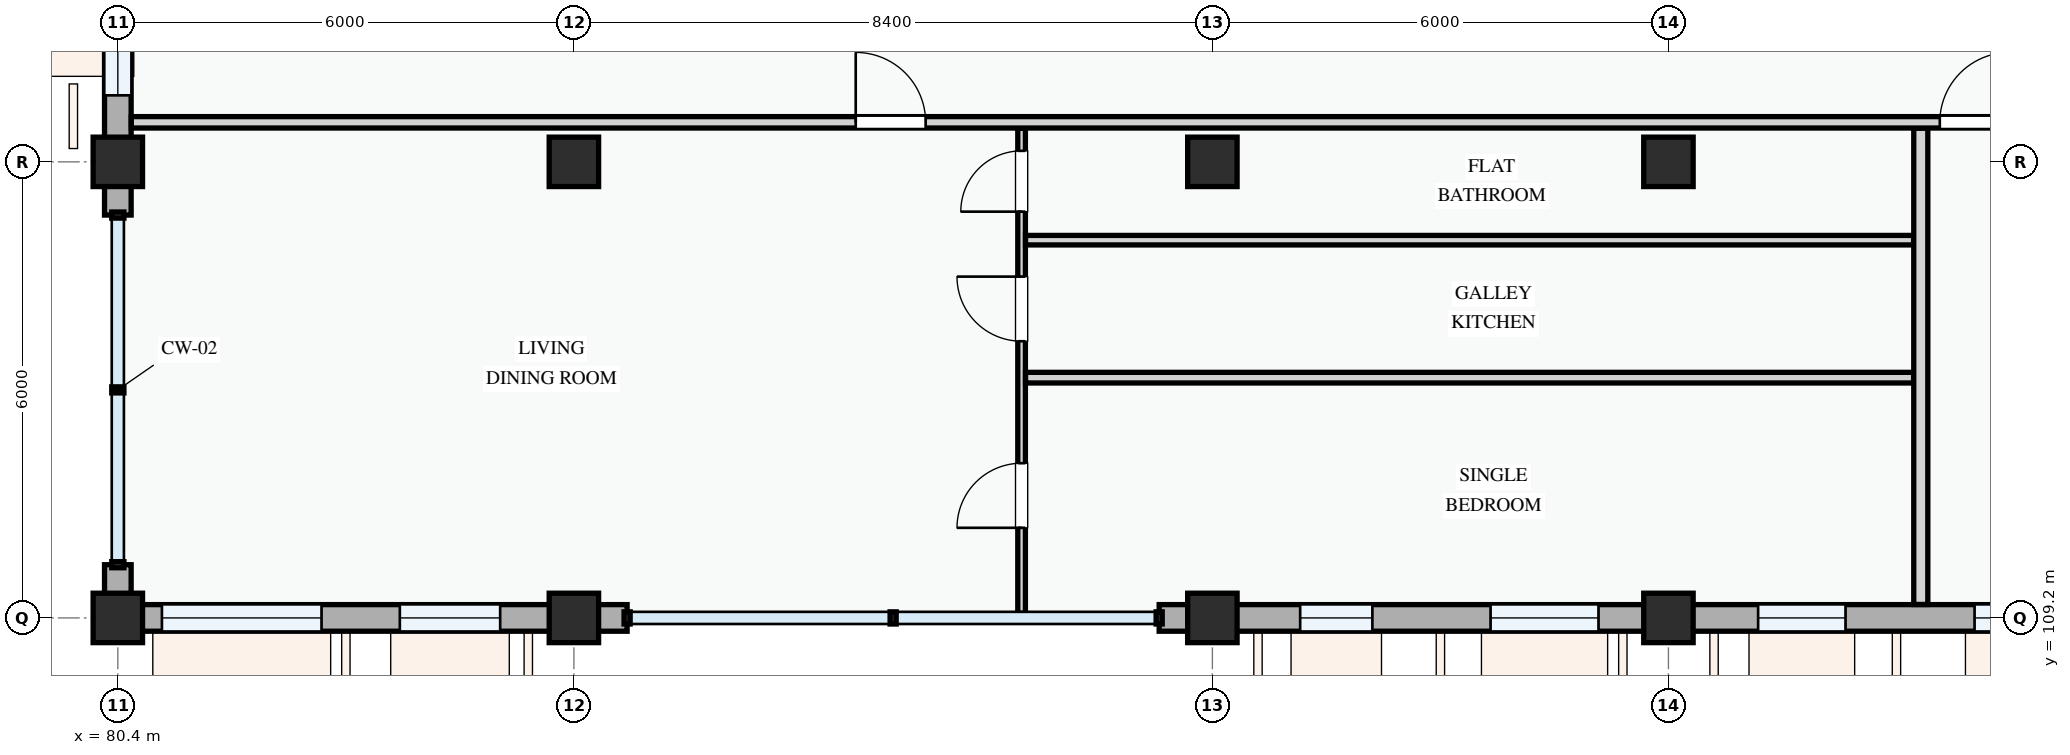
"""IFC4 building model, lengths in metres.
Left out: names, types, materials, properties, quantities, classifications, styles, units other than length and angle.
Written with IfcOpenShell. Run it as: python <this file> out.ifc"""

import sys

from ifc_helpers import new_model, si_unit, direction, frame, frame_2d, origin, origin_2d, place, context, subcontext, project, spatial, rectangle, extrude, element, fill, save


model = new_model("IFC4")
c1 = context("Model", 3, precision=1e-05, world=origin(), true_north=direction((0.0, 1.0)))
c2 = subcontext(c1, "Body", "Model", "MODEL_VIEW")
j1 = project(units=[si_unit("LENGTHUNIT", "METRE"), si_unit("PLANEANGLEUNIT", "RADIAN")], contexts=[c1])
p1 = place(None, origin())
s1 = spatial("IfcSite", under=j1, at=p1, CompositionType="ELEMENT")
p2 = place(p1, origin())
s2 = spatial("IfcBuilding", under=s1, at=p2, CompositionType="ELEMENT")
p3 = place(p2, frame((0.0, 0.0, 11.4)))
s3 = spatial("IfcBuildingStorey", under=s2, at=p3, CompositionType="ELEMENT", Elevation=11.4)
for number, where, z_axis, x_axis in (
    (1, (80.4, 109.2, 0.0), (0.0, 0.0, 1.0), (1.0, 0.0, 0.0)),
    (2, (80.4, 115.2, 0.0), (0.0, 0.0, 1.0), (1.0, 0.0, 0.0)),
    (3, (86.4, 109.2, 0.0), (0.0, 0.0, 1.0), (1.0, 0.0, 0.0)),
    (4, (86.4, 115.2, 0.0), (0.0, 0.0, 1.0), (1.0, 0.0, 0.0)),
    (5, (94.8, 109.2, 0.0), (0.0, 0.0, 1.0), (1.0, 0.0, 0.0)),
    (6, (94.8, 115.2, 0.0), (0.0, 0.0, 1.0), (1.0, 0.0, 0.0)),
    (7, (100.8, 109.2, 0.0), (0.0, 0.0, 1.0), (1.0, 0.0, 0.0)),
    (8, (100.8, 115.2, 0.0), (0.0, 0.0, 1.0), (1.0, 0.0, 0.0)),
):
    element("IfcColumn", number, at=place(p3, frame(where, z_axis=z_axis, x_axis=x_axis)), inside=s3, PredefinedType="COLUMN", context=c2, shape_type="SweptSolid", body=[
        extrude(rectangle(XDim=0.65, YDim=0.65, at=origin_2d()), origin(), (0.0, 0.0, 1.0), 3.3),
    ])
p4 = place(p3, frame((80.4, 123.6, 0.0), z_axis=(0.0, 0.0, 1.0), x_axis=(0.0, -1.0, 0.0)))
e9 = element("IfcWall", 9, at=p4, inside=s3, PredefinedType="STANDARD", context=c2, shape_type="SweptSolid", body=[
    extrude(rectangle(XDim=8.4, YDim=0.35, at=frame_2d((4.2, 0.0))), origin(), (0.0, 0.0, 1.0), 2.425),
])
p5 = place(p4, frame((0.593, 0.0, 0.78)))
e10 = element("IfcOpeningElement", 10, at=p5, cuts=e9, PredefinedType="OPENING", context=c2, shape_type="SweptSolid", body=[
    extrude(rectangle(XDim=2.18, YDim=1.48, at=frame_2d((1.09, 0.74))), frame((0.0, 0.185, 0.0), z_axis=(0.0, -1.0, 0.0), x_axis=(1.0, 0.0, 0.0)), (0.0, 0.0, 1.0), 0.37),
])
p6 = place(p4, frame((4.028, 0.0, 0.78)))
e11 = element("IfcOpeningElement", 11, at=p6, cuts=e9, PredefinedType="OPENING", context=c2, shape_type="SweptSolid", body=[
    extrude(rectangle(XDim=1.0, YDim=1.25, at=frame_2d((0.5, 0.625))), frame((0.0, 0.185, 0.0), z_axis=(0.0, -1.0, 0.0), x_axis=(1.0, 0.0, 0.0)), (0.0, 0.0, 1.0), 0.37),
])
p7 = place(p4, frame((6.375, 0.0, 0.78)))
e12 = element("IfcOpeningElement", 12, at=p7, cuts=e9, PredefinedType="OPENING", context=c2, shape_type="SweptSolid", body=[
    extrude(rectangle(XDim=1.15, YDim=1.25, at=frame_2d((0.575, 0.625))), frame((0.0, 0.185, 0.0), z_axis=(0.0, -1.0, 0.0), x_axis=(1.0, 0.0, 0.0)), (0.0, 0.0, 1.0), 0.37),
])
p8 = place(p3, frame((80.4, 115.2, 0.0), z_axis=(0.0, 0.0, 1.0), x_axis=(0.0, -1.0, 0.0)))
e13 = element("IfcWall", 13, at=p8, inside=s3, PredefinedType="STANDARD", context=c2, shape_type="SweptSolid", body=[
    extrude(rectangle(XDim=0.7, YDim=0.35, at=frame_2d((0.35, 0.0))), origin(), (0.0, 0.0, 1.0), 2.575),
])
p9 = place(p3, frame((80.4, 109.9, 0.0), z_axis=(0.0, 0.0, 1.0), x_axis=(0.0, -1.0, 0.0)))
e14 = element("IfcWall", 14, at=p9, inside=s3, PredefinedType="STANDARD", context=c2, shape_type="SweptSolid", body=[
    extrude(rectangle(XDim=0.523, YDim=0.35, at=frame_2d((0.261, 0.0))), origin(), (0.0, 0.0, 1.0), 2.575),
])
p10 = place(p3, frame((80.4, 109.2, 0.0), z_axis=(0.0, 0.0, 1.0), x_axis=(1.0, 0.0, 0.0)))
e15 = element("IfcWall", 15, at=p10, inside=s3, PredefinedType="STANDARD", context=c2, shape_type="SweptSolid", body=[
    extrude(rectangle(XDim=6.0, YDim=0.35, at=frame_2d((3.0, 0.0))), origin(), (0.0, 0.0, 1.0), 2.475),
])
p11 = place(p10, frame((0.58, 0.0, 0.78)))
e16 = element("IfcOpeningElement", 16, at=p11, cuts=e15, PredefinedType="OPENING", context=c2, shape_type="SweptSolid", body=[
    extrude(rectangle(XDim=2.1, YDim=1.55, at=frame_2d((1.05, 0.775))), frame((0.0, 0.185, 0.0), z_axis=(0.0, -1.0, 0.0), x_axis=(1.0, 0.0, 0.0)), (0.0, 0.0, 1.0), 0.37),
])
p12 = place(p10, frame((3.71, 0.0, 0.78)))
e17 = element("IfcOpeningElement", 17, at=p12, cuts=e15, PredefinedType="OPENING", context=c2, shape_type="SweptSolid", body=[
    extrude(rectangle(XDim=1.32, YDim=1.35, at=frame_2d((0.66, 0.675))), frame((0.0, 0.185, 0.0), z_axis=(0.0, -1.0, 0.0), x_axis=(1.0, 0.0, 0.0)), (0.0, 0.0, 1.0), 0.37),
])
p13 = place(p3, frame((86.4, 109.2, 0.0), z_axis=(0.0, 0.0, 1.0), x_axis=(1.0, 0.0, 0.0)))
e18 = element("IfcWall", 18, at=p13, inside=s3, PredefinedType="STANDARD", context=c2, shape_type="SweptSolid", body=[
    extrude(rectangle(XDim=0.7, YDim=0.35, at=frame_2d((0.35, 0.0))), origin(), (0.0, 0.0, 1.0), 2.375),
])
p14 = place(p3, frame((94.1, 109.2, 0.0), z_axis=(0.0, 0.0, 1.0), x_axis=(1.0, 0.0, 0.0)))
e19 = element("IfcWall", 19, at=p14, inside=s3, PredefinedType="STANDARD", context=c2, shape_type="SweptSolid", body=[
    extrude(rectangle(XDim=0.7, YDim=0.35, at=frame_2d((0.35, 0.0))), origin(), (0.0, 0.0, 1.0), 2.375),
])
p15 = place(p3, frame((94.8, 109.2, 0.0), z_axis=(0.0, 0.0, 1.0), x_axis=(1.0, 0.0, 0.0)))
e20 = element("IfcWall", 20, at=p15, inside=s3, PredefinedType="STANDARD", context=c2, shape_type="SweptSolid", body=[
    extrude(rectangle(XDim=6.0, YDim=0.35, at=frame_2d((3.0, 0.0))), origin(), (0.0, 0.0, 1.0), 2.475),
])
p16 = place(p15, frame((1.155, 0.0, 0.78)))
e21 = element("IfcOpeningElement", 21, at=p16, cuts=e20, PredefinedType="OPENING", context=c2, shape_type="SweptSolid", body=[
    extrude(rectangle(XDim=0.95, YDim=1.15, at=frame_2d((0.475, 0.575))), frame((0.0, 0.185, 0.0), z_axis=(0.0, -1.0, 0.0), x_axis=(1.0, 0.0, 0.0)), (0.0, 0.0, 1.0), 0.37),
])
p17 = place(p15, frame((3.66, 0.0, 0.78)))
e22 = element("IfcOpeningElement", 22, at=p17, cuts=e20, PredefinedType="OPENING", context=c2, shape_type="SweptSolid", body=[
    extrude(rectangle(XDim=1.42, YDim=1.38, at=frame_2d((0.71, 0.69))), frame((0.0, 0.185, 0.0), z_axis=(0.0, -1.0, 0.0), x_axis=(1.0, 0.0, 0.0)), (0.0, 0.0, 1.0), 0.37),
])
p18 = place(p3, frame((100.8, 109.2, 0.0), z_axis=(0.0, 0.0, 1.0), x_axis=(1.0, 0.0, 0.0)))
e23 = element("IfcWall", 23, at=p18, inside=s3, PredefinedType="STANDARD", context=c2, shape_type="SweptSolid", body=[
    extrude(rectangle(XDim=8.4, YDim=0.35, at=frame_2d((4.2, 0.0))), origin(), (0.0, 0.0, 1.0), 2.375),
])
p19 = place(p18, frame((1.18, 0.0, 0.78)))
e24 = element("IfcOpeningElement", 24, at=p19, cuts=e23, PredefinedType="OPENING", context=c2, shape_type="SweptSolid", body=[
    extrude(rectangle(XDim=1.15, YDim=1.25, at=frame_2d((0.575, 0.625))), frame((0.0, 0.185, 0.0), z_axis=(0.0, -1.0, 0.0), x_axis=(1.0, 0.0, 0.0)), (0.0, 0.0, 1.0), 0.37),
])
p20 = place(p18, frame((4.028, 0.0, 0.78)))
e25 = element("IfcOpeningElement", 25, at=p20, cuts=e23, PredefinedType="OPENING", context=c2, shape_type="SweptSolid", body=[
    extrude(rectangle(XDim=1.1, YDim=1.3, at=frame_2d((0.55, 0.65))), frame((0.0, 0.185, 0.0), z_axis=(0.0, -1.0, 0.0), x_axis=(1.0, 0.0, 0.0)), (0.0, 0.0, 1.0), 0.37),
])
p21 = place(p18, frame((6.427, 0.0, 0.78)))
e26 = element("IfcOpeningElement", 26, at=p21, cuts=e23, PredefinedType="OPENING", context=c2, shape_type="SweptSolid", body=[
    extrude(rectangle(XDim=1.05, YDim=1.2, at=frame_2d((0.525, 0.6))), frame((0.0, 0.185, 0.0), z_axis=(0.0, -1.0, 0.0), x_axis=(1.0, 0.0, 0.0)), (0.0, 0.0, 1.0), 0.37),
])
p22 = place(p3, frame((92.29, 109.26, 0.0), z_axis=(0.0, 0.0, 1.0), x_axis=(0.0, 1.0, 0.0)))
e27 = element("IfcWall", 27, at=p22, inside=s3, PredefinedType="PARTITIONING", context=c2, shape_type="SweptSolid", body=[
    extrude(rectangle(XDim=6.383, YDim=0.1, at=frame_2d((3.191, 0.0))), origin(), (0.0, 0.0, 1.0), 3.0),
])
p23 = place(p22, frame((1.125, 0.0, 0.0)))
e28 = element("IfcOpeningElement", 28, at=p23, cuts=e27, PredefinedType="OPENING", context=c2, shape_type="SweptSolid", body=[
    extrude(rectangle(XDim=0.85, YDim=2.1, at=frame_2d((0.425, 1.05))), frame((0.0, 0.06, 0.0), z_axis=(0.0, -1.0, 0.0), x_axis=(1.0, 0.0, 0.0)), (0.0, 0.0, 1.0), 0.12),
])
p24 = place(p22, frame((3.58, 0.0, 0.0)))
e29 = element("IfcOpeningElement", 29, at=p24, cuts=e27, PredefinedType="OPENING", context=c2, shape_type="SweptSolid", body=[
    extrude(rectangle(XDim=0.85, YDim=2.1, at=frame_2d((0.425, 1.05))), frame((0.0, 0.06, 0.0), z_axis=(0.0, -1.0, 0.0), x_axis=(1.0, 0.0, 0.0)), (0.0, 0.0, 1.0), 0.12),
])
p25 = place(p22, frame((5.285, 0.0, 0.0)))
e30 = element("IfcOpeningElement", 30, at=p25, cuts=e27, PredefinedType="OPENING", context=c2, shape_type="SweptSolid", body=[
    extrude(rectangle(XDim=0.8, YDim=2.1, at=frame_2d((0.4, 1.05))), frame((0.0, 0.06, 0.0), z_axis=(0.0, -1.0, 0.0), x_axis=(1.0, 0.0, 0.0)), (0.0, 0.0, 1.0), 0.12),
])
p26 = place(p3, frame((92.342, 112.361, 0.0), z_axis=(0.0, 0.0, 1.0), x_axis=(1.0, 0.0, 0.0)))
e31 = element("IfcWall", 31, at=p26, inside=s3, PredefinedType="PARTITIONING", context=c2, shape_type="SweptSolid", body=[
    extrude(rectangle(XDim=11.683, YDim=0.14, at=frame_2d((5.842, 0.0))), origin(), (0.0, 0.0, 1.0), 3.0),
])
p27 = place(p3, frame((92.342, 114.17, 0.0), z_axis=(0.0, 0.0, 1.0), x_axis=(1.0, 0.0, 0.0)))
e32 = element("IfcWall", 32, at=p27, inside=s3, PredefinedType="PARTITIONING", context=c2, shape_type="SweptSolid", body=[
    extrude(rectangle(XDim=11.683, YDim=0.125, at=frame_2d((5.842, 0.0))), origin(), (0.0, 0.0, 1.0), 3.0),
])
p28 = place(p3, frame((104.12, 109.377, 0.0), z_axis=(0.0, 0.0, 1.0), x_axis=(0.0, 1.0, 0.0)))
e33 = element("IfcWall", 33, at=p28, inside=s3, PredefinedType="PARTITIONING", context=c2, shape_type="SweptSolid", body=[
    extrude(rectangle(XDim=6.266, YDim=0.185, at=frame_2d((3.133, 0.0))), origin(), (0.0, 0.0, 1.0), 3.0),
])
p29 = place(p3, frame((80.577, 115.72, 0.0), z_axis=(0.0, 0.0, 1.0), x_axis=(1.0, 0.0, 0.0)))
e34 = element("IfcWall", 34, at=p29, inside=s3, PredefinedType="PARTITIONING", context=c2, shape_type="SweptSolid", body=[
    extrude(rectangle(XDim=69.473, YDim=0.15, at=frame_2d((34.737, 0.0))), origin(), (0.0, 0.0, 1.0), 3.0),
])
p30 = place(p29, frame((9.531, 0.0, 0.0)))
e35 = element("IfcOpeningElement", 35, at=p30, cuts=e34, PredefinedType="OPENING", context=c2, shape_type="SweptSolid", body=[
    extrude(rectangle(XDim=0.92, YDim=2.1, at=frame_2d((0.46, 1.05))), frame((0.0, 0.085, 0.0), z_axis=(0.0, -1.0, 0.0), x_axis=(1.0, 0.0, 0.0)), (0.0, 0.0, 1.0), 0.17),
])
p31 = place(p29, frame((23.793, 0.0, 0.0)))
e36 = element("IfcOpeningElement", 36, at=p31, cuts=e34, PredefinedType="OPENING", context=c2, shape_type="SweptSolid", body=[
    extrude(rectangle(XDim=0.92, YDim=2.1, at=frame_2d((0.46, 1.05))), frame((0.0, 0.085, 0.0), z_axis=(0.0, -1.0, 0.0), x_axis=(1.0, 0.0, 0.0)), (0.0, 0.0, 1.0), 0.17),
])
p32 = place(p29, frame((52.74, 0.0, 0.0)))
e37 = element("IfcOpeningElement", 37, at=p32, cuts=e34, PredefinedType="OPENING", context=c2, shape_type="SweptSolid", body=[
    extrude(rectangle(XDim=0.92, YDim=2.1, at=frame_2d((0.46, 1.05))), frame((0.0, 0.085, 0.0), z_axis=(0.0, -1.0, 0.0), x_axis=(1.0, 0.0, 0.0)), (0.0, 0.0, 1.0), 0.17),
])
p33 = place(p7, origin())
e38 = element("IfcWindow", 38, at=p33, inside=s3, PartitioningType="SINGLE_PANEL", PredefinedType="WINDOW", context=c2, shape_type="SweptSolid", body=[
    extrude(rectangle(XDim=1.15, YDim=1.25, at=frame_2d((0.575, 0.625))), frame((0.0, 0.03, 0.0), z_axis=(0.0, -1.0, 0.0), x_axis=(1.0, 0.0, 0.0)), (0.0, 0.0, 1.0), 0.06),
])
fill(e12, e38)
p34 = place(p11, origin())
e39 = element("IfcWindow", 39, at=p34, inside=s3, PartitioningType="DOUBLE_PANEL_VERTICAL", PredefinedType="WINDOW", context=c2, shape_type="SweptSolid", body=[
    extrude(rectangle(XDim=2.1, YDim=1.55, at=frame_2d((1.05, 0.775))), frame((0.0, 0.03, 0.0), z_axis=(0.0, -1.0, 0.0), x_axis=(1.0, 0.0, 0.0)), (0.0, 0.0, 1.0), 0.06),
])
fill(e16, e39)
p35 = place(p12, origin())
e40 = element("IfcWindow", 40, at=p35, inside=s3, PartitioningType="SINGLE_PANEL", PredefinedType="WINDOW", context=c2, shape_type="SweptSolid", body=[
    extrude(rectangle(XDim=1.32, YDim=1.35, at=frame_2d((0.66, 0.675))), frame((0.0, 0.03, 0.0), z_axis=(0.0, -1.0, 0.0), x_axis=(1.0, 0.0, 0.0)), (0.0, 0.0, 1.0), 0.06),
])
fill(e17, e40)
p36 = place(p16, origin())
e41 = element("IfcWindow", 41, at=p36, inside=s3, PartitioningType="SINGLE_PANEL", PredefinedType="WINDOW", context=c2, shape_type="SweptSolid", body=[
    extrude(rectangle(XDim=0.95, YDim=1.15, at=frame_2d((0.475, 0.575))), frame((0.0, 0.03, 0.0), z_axis=(0.0, -1.0, 0.0), x_axis=(1.0, 0.0, 0.0)), (0.0, 0.0, 1.0), 0.06),
])
fill(e21, e41)
p37 = place(p17, origin())
e42 = element("IfcWindow", 42, at=p37, inside=s3, PartitioningType="SINGLE_PANEL", PredefinedType="WINDOW", context=c2, shape_type="SweptSolid", body=[
    extrude(rectangle(XDim=1.42, YDim=1.38, at=frame_2d((0.71, 0.69))), frame((0.0, 0.03, 0.0), z_axis=(0.0, -1.0, 0.0), x_axis=(1.0, 0.0, 0.0)), (0.0, 0.0, 1.0), 0.06),
])
fill(e22, e42)
p38 = place(p19, origin())
e43 = element("IfcWindow", 43, at=p38, inside=s3, PartitioningType="SINGLE_PANEL", PredefinedType="WINDOW", context=c2, shape_type="SweptSolid", body=[
    extrude(rectangle(XDim=1.15, YDim=1.25, at=frame_2d((0.575, 0.625))), frame((0.0, 0.03, 0.0), z_axis=(0.0, -1.0, 0.0), x_axis=(1.0, 0.0, 0.0)), (0.0, 0.0, 1.0), 0.06),
])
fill(e24, e43)
p39 = place(p20, origin())
e44 = element("IfcWindow", 44, at=p39, inside=s3, PartitioningType="SINGLE_PANEL", PredefinedType="WINDOW", context=c2, shape_type="SweptSolid", body=[
    extrude(rectangle(XDim=1.1, YDim=1.3, at=frame_2d((0.55, 0.65))), frame((0.0, 0.03, 0.0), z_axis=(0.0, -1.0, 0.0), x_axis=(1.0, 0.0, 0.0)), (0.0, 0.0, 1.0), 0.06),
])
fill(e25, e44)
p40 = place(p23, origin())
e45 = element("IfcDoor", 45, at=p40, inside=s3, OperationType="SINGLE_SWING_LEFT", PredefinedType="DOOR", context=c2, shape_type="SweptSolid", body=[
    extrude(rectangle(XDim=0.85, YDim=2.1, at=frame_2d((0.425, 1.05))), frame((0.0, 0.025, 0.0), z_axis=(0.0, -1.0, 0.0), x_axis=(1.0, 0.0, 0.0)), (0.0, 0.0, 1.0), 0.05),
])
fill(e28, e45)
p41 = place(p24, origin())
e46 = element("IfcDoor", 46, at=p41, inside=s3, OperationType="SINGLE_SWING_RIGHT", PredefinedType="DOOR", context=c2, shape_type="SweptSolid", body=[
    extrude(rectangle(XDim=0.85, YDim=2.1, at=frame_2d((0.425, 1.05))), frame((0.0, 0.025, 0.0), z_axis=(0.0, -1.0, 0.0), x_axis=(1.0, 0.0, 0.0)), (0.0, 0.0, 1.0), 0.05),
])
fill(e29, e46)
p42 = place(p25, origin())
e47 = element("IfcDoor", 47, at=p42, inside=s3, OperationType="SINGLE_SWING_LEFT", PredefinedType="DOOR", context=c2, shape_type="SweptSolid", body=[
    extrude(rectangle(XDim=0.8, YDim=2.1, at=frame_2d((0.4, 1.05))), frame((0.0, 0.025, 0.0), z_axis=(0.0, -1.0, 0.0), x_axis=(1.0, 0.0, 0.0)), (0.0, 0.0, 1.0), 0.05),
])
fill(e30, e47)
p43 = place(p30, origin())
e48 = element("IfcDoor", 48, at=p43, inside=s3, OperationType="SINGLE_SWING_LEFT", PredefinedType="DOOR", context=c2, shape_type="SweptSolid", body=[
    extrude(rectangle(XDim=0.92, YDim=2.1, at=frame_2d((0.46, 1.05))), frame((0.0, 0.025, 0.0), z_axis=(0.0, -1.0, 0.0), x_axis=(1.0, 0.0, 0.0)), (0.0, 0.0, 1.0), 0.05),
])
fill(e35, e48)
p44 = place(p31, origin())
e49 = element("IfcDoor", 49, at=p44, inside=s3, OperationType="SINGLE_SWING_RIGHT", PredefinedType="DOOR", context=c2, shape_type="SweptSolid", body=[
    extrude(rectangle(XDim=0.92, YDim=2.1, at=frame_2d((0.46, 1.05))), frame((0.0, 0.025, 0.0), z_axis=(0.0, -1.0, 0.0), x_axis=(1.0, 0.0, 0.0)), (0.0, 0.0, 1.0), 0.05),
])
fill(e36, e49)
save(model, sys.argv[1])
